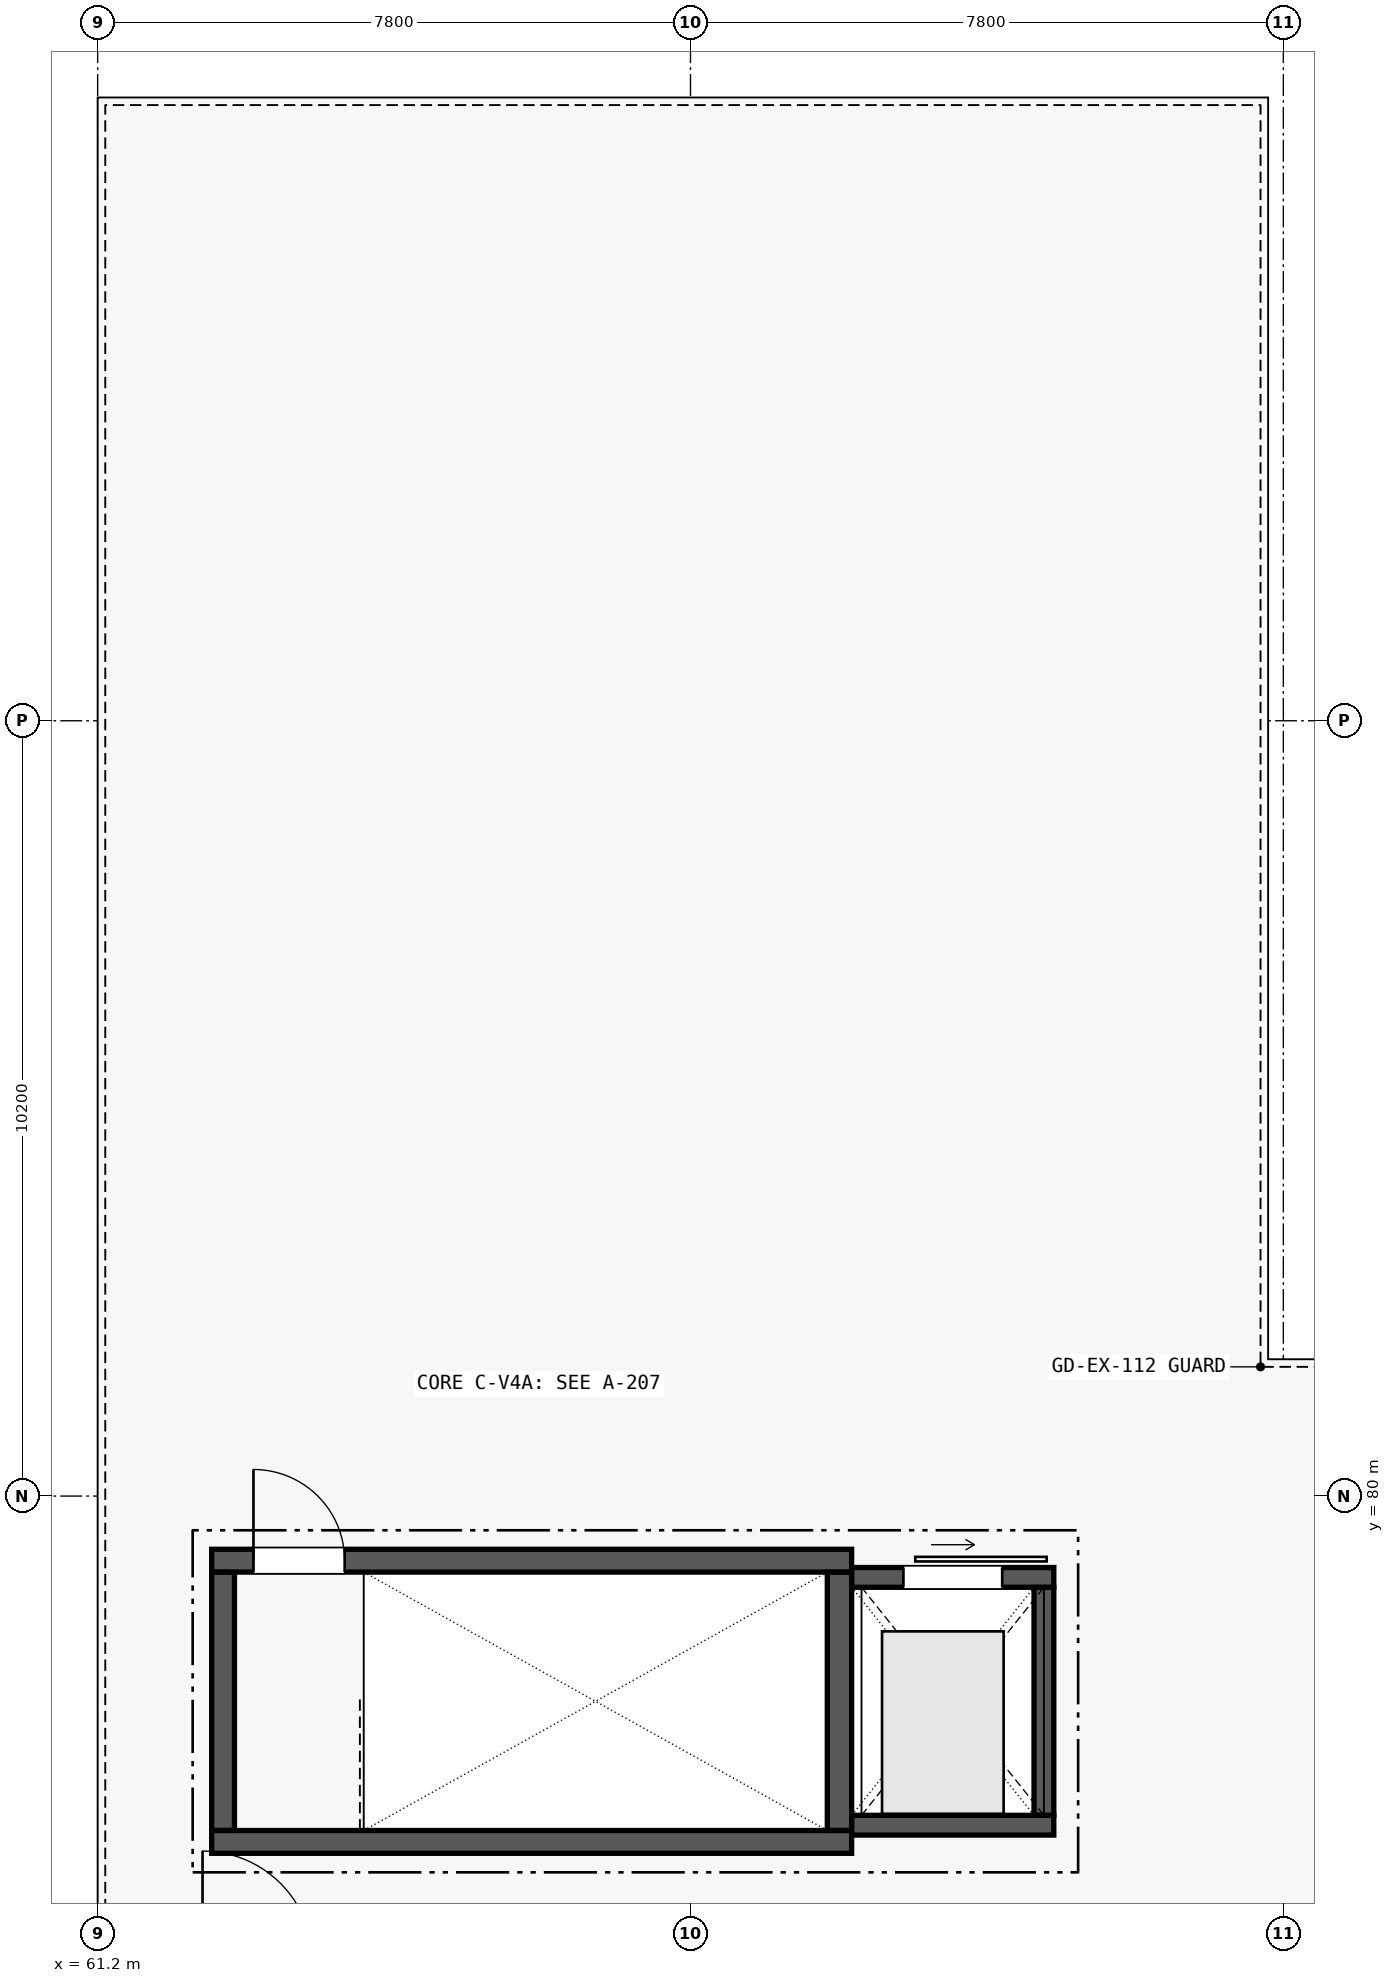
"""IFC4 building model, lengths in metres.
Left out: names, types, materials, properties, quantities, classifications, styles, units other than length and angle.
Written with IfcOpenShell. Run it as: python <this file> out.ifc"""

import sys

from ifc_helpers import new_model, si_unit, direction, frame, frame_2d, origin, place, context, subcontext, project, spatial, rectangle, extrude, element, fill, save


model = new_model("IFC4")
c1 = context("Model", 3, precision=1e-05, world=origin(), true_north=direction((0.0, 1.0)))
c2 = subcontext(c1, "Body", "Model", "MODEL_VIEW")
j1 = project(units=[si_unit("LENGTHUNIT", "METRE"), si_unit("PLANEANGLEUNIT", "RADIAN")], contexts=[c1])
p1 = place(None, origin())
s1 = spatial("IfcSite", under=j1, at=p1, CompositionType="ELEMENT")
p2 = place(p1, origin())
s2 = spatial("IfcBuilding", under=s1, at=p2, CompositionType="ELEMENT")
p3 = place(p2, frame((0.0, 0.0, 17.68)))
s3 = spatial("IfcBuildingStorey", under=s2, at=p3, CompositionType="ELEMENT", Elevation=17.68)
p4 = place(p3, frame((61.32, 99.02, 0.0), z_axis=(0.0, 0.0, 1.0), x_axis=(1.0, 0.0, 0.0)))
e1 = element("IfcWall", 1, at=p4, inside=s3, PredefinedType="PARAPET", context=c2, shape_type="SweptSolid", body=[
    extrude(rectangle(XDim=29.25, YDim=0.225, at=frame_2d((14.625, 0.0))), origin(), (0.0, 0.0, 1.0), 1.2),
])
p5 = place(p3, frame((62.7, 75.45, 0.0), z_axis=(0.0, 0.0, 1.0), x_axis=(1.0, 0.0, 0.0)))
e2 = element("IfcWall", 2, at=p5, inside=s3, PredefinedType="SHEAR", context=c2, shape_type="SweptSolid", body=[
    extrude(rectangle(XDim=8.42, YDim=0.3, at=frame_2d((4.21, 0.0))), origin(), (0.0, 0.0, 1.0), 3.81),
])
p6 = place(p3, frame((62.7, 79.15, 0.0), z_axis=(0.0, 0.0, 1.0), x_axis=(1.0, 0.0, 0.0)))
e3 = element("IfcWall", 3, at=p6, inside=s3, PredefinedType="SHEAR", context=c2, shape_type="SweptSolid", body=[
    extrude(rectangle(XDim=8.42, YDim=0.3, at=frame_2d((4.21, 0.0))), origin(), (0.0, 0.0, 1.0), 3.81),
])
p7 = place(p6, frame((0.55, 0.0, 0.0)))
e4 = element("IfcOpeningElement", 4, at=p7, cuts=e3, PredefinedType="OPENING", context=c2, shape_type="SweptSolid", body=[
    extrude(rectangle(XDim=1.2, YDim=2.2, at=frame_2d((0.6, 1.1))), frame((0.0, 0.16, 0.0), z_axis=(0.0, -1.0, 0.0), x_axis=(1.0, 0.0, 0.0)), (0.0, 0.0, 1.0), 0.32),
])
p8 = place(p3, frame((62.85, 75.602, 0.0), z_axis=(0.0, 0.0, 1.0), x_axis=(0.0, 1.0, 0.0)))
e5 = element("IfcWall", 5, at=p8, inside=s3, PredefinedType="SHEAR", context=c2, shape_type="SweptSolid", body=[
    extrude(rectangle(XDim=3.396, YDim=0.3, at=frame_2d((1.698, 0.0))), origin(), (0.0, 0.0, 1.0), 3.81),
])
p9 = place(p3, frame((70.96, 75.602, 0.0), z_axis=(0.0, 0.0, 1.0), x_axis=(0.0, 1.0, 0.0)))
e6 = element("IfcWall", 6, at=p9, inside=s3, PredefinedType="SHEAR", context=c2, shape_type="SweptSolid", body=[
    extrude(rectangle(XDim=3.396, YDim=0.32, at=frame_2d((1.698, 0.0))), origin(), (0.0, 0.0, 1.0), 3.81),
])
p10 = place(p3, frame((71.122, 75.67, 0.0), z_axis=(0.0, 0.0, 1.0), x_axis=(1.0, 0.0, 0.0)))
e7 = element("IfcWall", 7, at=p10, inside=s3, PredefinedType="SHEAR", context=c2, shape_type="SweptSolid", body=[
    extrude(rectangle(XDim=2.658, YDim=0.26, at=frame_2d((1.329, 0.0))), origin(), (0.0, 0.0, 1.0), 3.81),
])
p11 = place(p3, frame((71.122, 78.93, 0.0), z_axis=(0.0, 0.0, 1.0), x_axis=(1.0, 0.0, 0.0)))
e8 = element("IfcWall", 8, at=p11, inside=s3, PredefinedType="SHEAR", context=c2, shape_type="SweptSolid", body=[
    extrude(rectangle(XDim=2.658, YDim=0.26, at=frame_2d((1.329, 0.0))), origin(), (0.0, 0.0, 1.0), 3.81),
])
p12 = place(p11, frame((0.679, 0.0, 0.0)))
e9 = element("IfcOpeningElement", 9, at=p12, cuts=e8, PredefinedType="OPENING", context=c2, shape_type="SweptSolid", body=[
    extrude(rectangle(XDim=1.3, YDim=2.2, at=frame_2d((0.65, 1.1))), frame((0.0, 0.14, 0.0), z_axis=(0.0, -1.0, 0.0), x_axis=(1.0, 0.0, 0.0)), (0.0, 0.0, 1.0), 0.28),
])
p13 = place(p3, frame((73.65, 75.802, 0.0), z_axis=(0.0, 0.0, 1.0), x_axis=(0.0, 1.0, 0.0)))
e10 = element("IfcWall", 10, at=p13, inside=s3, PredefinedType="SHEAR", context=c2, shape_type="SweptSolid", body=[
    extrude(rectangle(XDim=2.996, YDim=0.26, at=frame_2d((1.498, 0.0))), origin(), (0.0, 0.0, 1.0), 3.81),
])
p14 = place(p7, origin())
e11 = element("IfcDoor", 11, at=p14, inside=s3, OperationType="SINGLE_SWING_LEFT", PredefinedType="DOOR", context=c2, shape_type="SweptSolid", body=[
    extrude(rectangle(XDim=1.2, YDim=2.2, at=frame_2d((0.6, 1.1))), frame((0.0, 0.025, 0.0), z_axis=(0.0, -1.0, 0.0), x_axis=(1.0, 0.0, 0.0)), (0.0, 0.0, 1.0), 0.05),
])
fill(e4, e11)
p15 = place(p12, origin())
e12 = element("IfcDoor", 12, at=p15, inside=s3, OperationType="SLIDING_TO_RIGHT", PredefinedType="DOOR", context=c2, shape_type="SweptSolid", body=[
    extrude(rectangle(XDim=1.3, YDim=2.2, at=frame_2d((0.65, 1.1))), frame((0.0, 0.025, 0.0), z_axis=(0.0, -1.0, 0.0), x_axis=(1.0, 0.0, 0.0)), (0.0, 0.0, 1.0), 0.05),
])
fill(e9, e12)
save(model, sys.argv[1])
